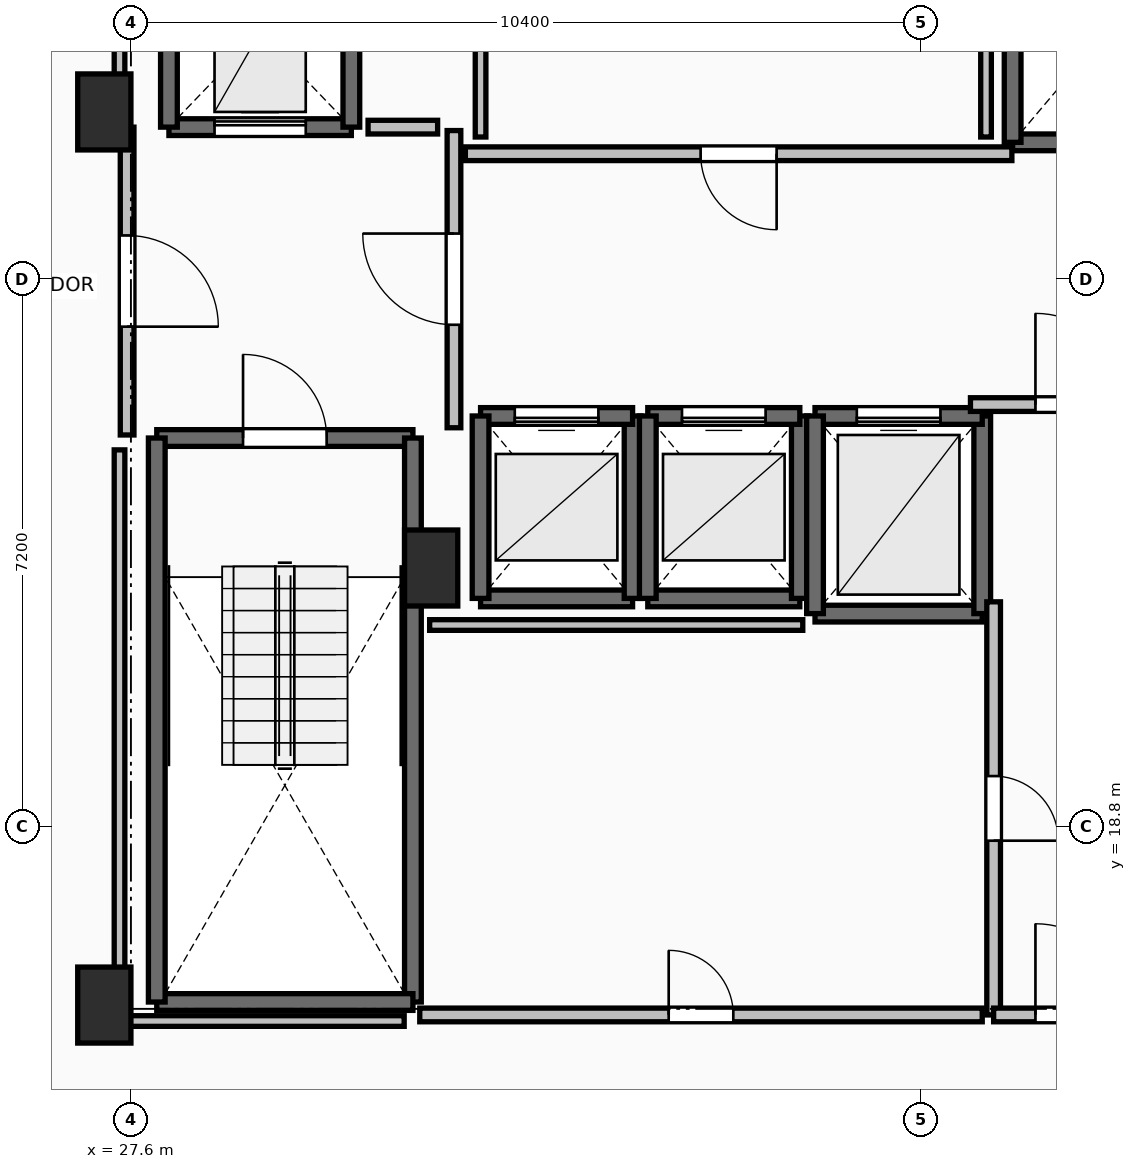
"""IFC4 building model, lengths in metres.
Left out: names, types, materials, properties, quantities, classifications, styles, units other than length and angle.
Written with IfcOpenShell. Run it as: python <this file> out.ifc"""

import sys

from ifc_helpers import new_model, si_unit, direction, frame, frame_2d, origin, origin_2d, place, context, subcontext, project, spatial, rectangle, extrude, element, fill, save


model = new_model("IFC4")
c1 = context("Model", 3, precision=1e-05, world=origin(), true_north=direction((0.0, 1.0)))
c2 = subcontext(c1, "Body", "Model", "MODEL_VIEW")
j1 = project(units=[si_unit("LENGTHUNIT", "METRE"), si_unit("PLANEANGLEUNIT", "RADIAN")], contexts=[c1])
p1 = place(None, origin())
s1 = spatial("IfcSite", under=j1, at=p1, CompositionType="ELEMENT")
p2 = place(p1, origin())
s2 = spatial("IfcBuilding", under=s1, at=p2, CompositionType="ELEMENT")
p3 = place(p2, frame((0.0, 0.0, 182.6)))
s3 = spatial("IfcBuildingStorey", under=s2, at=p3, CompositionType="ELEMENT", Elevation=182.6)
for number, where, z_axis, x_axis in (
    (1, (27.25, 16.45, 0.0), (0.0, 0.0, 1.0), (1.0, 0.0, 0.0)),
    (2, (27.25, 28.2, 0.0), (0.0, 0.0, 1.0), (1.0, 0.0, 0.0)),
    (3, (31.55, 22.2, 0.0), (0.0, 0.0, 1.0), (1.0, 0.0, 0.0)),
):
    element("IfcColumn", number, at=place(p3, frame(where, z_axis=z_axis, x_axis=x_axis)), inside=s3, PredefinedType="PILASTER", context=c2, shape_type="SweptSolid", body=[
        extrude(rectangle(XDim=0.7, YDim=1.0, at=origin_2d()), origin(), (0.0, 0.0, 1.0), 3.5),
    ])
p4 = place(p3, frame((27.94, 23.91, 0.0), z_axis=(0.0, 0.0, 1.0), x_axis=(1.0, 0.0, 0.0)))
e4 = element("IfcWall", 4, at=p4, inside=s3, PredefinedType="SOLIDWALL", context=c2, shape_type="SweptSolid", body=[
    extrude(rectangle(XDim=3.37, YDim=0.22, at=frame_2d((1.685, 0.0))), origin(), (0.0, 0.0, 1.0), 3.24),
])
p5 = place(p4, frame((1.135, 0.0, 0.0)))
e5 = element("IfcOpeningElement", 5, at=p5, cuts=e4, PredefinedType="OPENING", context=c2, shape_type="SweptSolid", body=[
    extrude(rectangle(XDim=1.1, YDim=2.15, at=frame_2d((0.55, 1.075))), frame((0.0, 0.125, 0.0), z_axis=(0.0, -1.0, 0.0), x_axis=(1.0, 0.0, 0.0)), (0.0, 0.0, 1.0), 0.25),
])
p6 = place(p3, frame((31.31, 23.91, 0.0), z_axis=(0.0, 0.0, 1.0), x_axis=(0.0, -1.0, 0.0)))
e6 = element("IfcWall", 6, at=p6, inside=s3, PredefinedType="SOLIDWALL", context=c2, shape_type="SweptSolid", body=[
    extrude(rectangle(XDim=7.42, YDim=0.22, at=frame_2d((3.71, 0.0))), origin(), (0.0, 0.0, 1.0), 3.24),
])
p7 = place(p3, frame((31.31, 16.49, 0.0), z_axis=(0.0, 0.0, 1.0), x_axis=(-1.0, 0.0, 0.0)))
e7 = element("IfcWall", 7, at=p7, inside=s3, PredefinedType="SOLIDWALL", context=c2, shape_type="SweptSolid", body=[
    extrude(rectangle(XDim=3.37, YDim=0.22, at=frame_2d((1.685, 0.0))), origin(), (0.0, 0.0, 1.0), 3.24),
])
p8 = place(p3, frame((27.94, 16.49, 0.0), z_axis=(0.0, 0.0, 1.0), x_axis=(0.0, 1.0, 0.0)))
e8 = element("IfcWall", 8, at=p8, inside=s3, PredefinedType="SOLIDWALL", context=c2, shape_type="SweptSolid", body=[
    extrude(rectangle(XDim=7.42, YDim=0.22, at=frame_2d((3.71, 0.0))), origin(), (0.0, 0.0, 1.0), 3.24),
])
p9 = place(p3, frame((32.2, 21.8, 0.0), z_axis=(0.0, 0.0, 1.0), x_axis=(1.0, 0.0, 0.0)))
e9 = element("IfcWall", 9, at=p9, inside=s3, PredefinedType="SOLIDWALL", context=c2, shape_type="SweptSolid", body=[
    extrude(rectangle(XDim=2.0, YDim=0.22, at=frame_2d((1.0, 0.0))), origin(), (0.0, 0.0, 1.0), 3.24),
])
p10 = place(p3, frame((34.2, 21.8, 0.0), z_axis=(0.0, 0.0, 1.0), x_axis=(0.0, 1.0, 0.0)))
e10 = element("IfcWall", 10, at=p10, inside=s3, PredefinedType="SOLIDWALL", context=c2, shape_type="SweptSolid", body=[
    extrude(rectangle(XDim=2.4, YDim=0.22, at=frame_2d((1.2, 0.0))), origin(), (0.0, 0.0, 1.0), 3.24),
])
p11 = place(p3, frame((34.2, 24.2, 0.0), z_axis=(0.0, 0.0, 1.0), x_axis=(-1.0, 0.0, 0.0)))
e11 = element("IfcWall", 11, at=p11, inside=s3, PredefinedType="SOLIDWALL", context=c2, shape_type="SweptSolid", body=[
    extrude(rectangle(XDim=2.0, YDim=0.22, at=frame_2d((1.0, 0.0))), origin(), (0.0, 0.0, 1.0), 3.24),
])
p12 = place(p11, frame((0.45, 0.0, 0.0)))
e12 = element("IfcOpeningElement", 12, at=p12, cuts=e11, PredefinedType="OPENING", context=c2, shape_type="SweptSolid", body=[
    extrude(rectangle(XDim=1.1, YDim=2.2, at=frame_2d((0.55, 1.1))), frame((0.0, 0.125, 0.0), z_axis=(0.0, -1.0, 0.0), x_axis=(1.0, 0.0, 0.0)), (0.0, 0.0, 1.0), 0.25),
])
p13 = place(p3, frame((32.2, 24.2, 0.0), z_axis=(0.0, 0.0, 1.0), x_axis=(0.0, -1.0, 0.0)))
e13 = element("IfcWall", 13, at=p13, inside=s3, PredefinedType="SOLIDWALL", context=c2, shape_type="SweptSolid", body=[
    extrude(rectangle(XDim=2.4, YDim=0.22, at=frame_2d((1.2, 0.0))), origin(), (0.0, 0.0, 1.0), 3.24),
])
p14 = place(p3, frame((34.4, 21.8, 0.0), z_axis=(0.0, 0.0, 1.0), x_axis=(1.0, 0.0, 0.0)))
e14 = element("IfcWall", 14, at=p14, inside=s3, PredefinedType="SOLIDWALL", context=c2, shape_type="SweptSolid", body=[
    extrude(rectangle(XDim=2.0, YDim=0.22, at=frame_2d((1.0, 0.0))), origin(), (0.0, 0.0, 1.0), 3.24),
])
p15 = place(p3, frame((36.4, 21.8, 0.0), z_axis=(0.0, 0.0, 1.0), x_axis=(0.0, 1.0, 0.0)))
e15 = element("IfcWall", 15, at=p15, inside=s3, PredefinedType="SOLIDWALL", context=c2, shape_type="SweptSolid", body=[
    extrude(rectangle(XDim=2.4, YDim=0.22, at=frame_2d((1.2, 0.0))), origin(), (0.0, 0.0, 1.0), 3.24),
])
p16 = place(p3, frame((36.4, 24.2, 0.0), z_axis=(0.0, 0.0, 1.0), x_axis=(-1.0, 0.0, 0.0)))
e16 = element("IfcWall", 16, at=p16, inside=s3, PredefinedType="SOLIDWALL", context=c2, shape_type="SweptSolid", body=[
    extrude(rectangle(XDim=2.0, YDim=0.22, at=frame_2d((1.0, 0.0))), origin(), (0.0, 0.0, 1.0), 3.24),
])
p17 = place(p16, frame((0.45, 0.0, 0.0)))
e17 = element("IfcOpeningElement", 17, at=p17, cuts=e16, PredefinedType="OPENING", context=c2, shape_type="SweptSolid", body=[
    extrude(rectangle(XDim=1.1, YDim=2.2, at=frame_2d((0.55, 1.1))), frame((0.0, 0.125, 0.0), z_axis=(0.0, -1.0, 0.0), x_axis=(1.0, 0.0, 0.0)), (0.0, 0.0, 1.0), 0.25),
])
p18 = place(p3, frame((34.4, 24.2, 0.0), z_axis=(0.0, 0.0, 1.0), x_axis=(0.0, -1.0, 0.0)))
e18 = element("IfcWall", 18, at=p18, inside=s3, PredefinedType="SOLIDWALL", context=c2, shape_type="SweptSolid", body=[
    extrude(rectangle(XDim=2.4, YDim=0.22, at=frame_2d((1.2, 0.0))), origin(), (0.0, 0.0, 1.0), 3.24),
])
p19 = place(p3, frame((36.6, 21.6, 0.0), z_axis=(0.0, 0.0, 1.0), x_axis=(1.0, 0.0, 0.0)))
e19 = element("IfcWall", 19, at=p19, inside=s3, PredefinedType="SOLIDWALL", context=c2, shape_type="SweptSolid", body=[
    extrude(rectangle(XDim=2.2, YDim=0.22, at=frame_2d((1.1, 0.0))), origin(), (0.0, 0.0, 1.0), 3.24),
])
p20 = place(p3, frame((38.8, 21.6, 0.0), z_axis=(0.0, 0.0, 1.0), x_axis=(0.0, 1.0, 0.0)))
e20 = element("IfcWall", 20, at=p20, inside=s3, PredefinedType="SOLIDWALL", context=c2, shape_type="SweptSolid", body=[
    extrude(rectangle(XDim=2.6, YDim=0.22, at=frame_2d((1.3, 0.0))), origin(), (0.0, 0.0, 1.0), 3.24),
])
p21 = place(p3, frame((38.8, 24.2, 0.0), z_axis=(0.0, 0.0, 1.0), x_axis=(-1.0, 0.0, 0.0)))
e21 = element("IfcWall", 21, at=p21, inside=s3, PredefinedType="SOLIDWALL", context=c2, shape_type="SweptSolid", body=[
    extrude(rectangle(XDim=2.2, YDim=0.22, at=frame_2d((1.1, 0.0))), origin(), (0.0, 0.0, 1.0), 3.24),
])
p22 = place(p21, frame((0.55, 0.0, 0.0)))
e22 = element("IfcOpeningElement", 22, at=p22, cuts=e21, PredefinedType="OPENING", context=c2, shape_type="SweptSolid", body=[
    extrude(rectangle(XDim=1.1, YDim=2.2, at=frame_2d((0.55, 1.1))), frame((0.0, 0.125, 0.0), z_axis=(0.0, -1.0, 0.0), x_axis=(1.0, 0.0, 0.0)), (0.0, 0.0, 1.0), 0.25),
])
p23 = place(p3, frame((36.6, 24.2, 0.0), z_axis=(0.0, 0.0, 1.0), x_axis=(0.0, -1.0, 0.0)))
e23 = element("IfcWall", 23, at=p23, inside=s3, PredefinedType="SOLIDWALL", context=c2, shape_type="SweptSolid", body=[
    extrude(rectangle(XDim=2.6, YDim=0.22, at=frame_2d((1.3, 0.0))), origin(), (0.0, 0.0, 1.0), 3.24),
])
p24 = place(p3, frame((39.2, 27.8, 0.0), z_axis=(0.0, 0.0, 1.0), x_axis=(1.0, 0.0, 0.0)))
e24 = element("IfcWall", 24, at=p24, inside=s3, PredefinedType="SOLIDWALL", context=c2, shape_type="SweptSolid", body=[
    extrude(rectangle(XDim=2.2, YDim=0.22, at=frame_2d((1.1, 0.0))), origin(), (0.0, 0.0, 1.0), 3.24),
])
p25 = place(p3, frame((39.2, 30.4, 0.0), z_axis=(0.0, 0.0, 1.0), x_axis=(0.0, -1.0, 0.0)))
e25 = element("IfcWall", 25, at=p25, inside=s3, PredefinedType="SOLIDWALL", context=c2, shape_type="SweptSolid", body=[
    extrude(rectangle(XDim=2.6, YDim=0.22, at=frame_2d((1.3, 0.0))), origin(), (0.0, 0.0, 1.0), 3.24),
])
p26 = place(p3, frame((28.1, 28.0, 0.0), z_axis=(0.0, 0.0, 1.0), x_axis=(1.0, 0.0, 0.0)))
e26 = element("IfcWall", 26, at=p26, inside=s3, PredefinedType="SHEAR", context=c2, shape_type="SweptSolid", body=[
    extrude(rectangle(XDim=2.4, YDim=0.22, at=frame_2d((1.2, 0.0))), origin(), (0.0, 0.0, 1.0), 3.24),
])
p27 = place(p26, frame((0.6, 0.0, 0.0)))
e27 = element("IfcOpeningElement", 27, at=p27, cuts=e26, PredefinedType="OPENING", context=c2, shape_type="SweptSolid", body=[
    extrude(rectangle(XDim=1.2, YDim=2.2, at=frame_2d((0.6, 1.1))), frame((0.0, 0.125, 0.0), z_axis=(0.0, -1.0, 0.0), x_axis=(1.0, 0.0, 0.0)), (0.0, 0.0, 1.0), 0.25),
])
for number, where, z_axis, x_axis in (
    (28, (30.5, 28.0, 0.0), (0.0, 0.0, 1.0), (0.0, 1.0, 0.0)),
    (29, (28.1, 30.5, 0.0), (0.0, 0.0, 1.0), (0.0, -1.0, 0.0)),
):
    element("IfcWall", number, at=place(p3, frame(where, z_axis=z_axis, x_axis=x_axis)), inside=s3, PredefinedType="SHEAR", context=c2, shape_type="SweptSolid", body=[
        extrude(rectangle(XDim=2.5, YDim=0.22, at=frame_2d((1.25, 0.0))), origin(), (0.0, 0.0, 1.0), 3.24),
    ])
p28 = place(p3, frame((31.85, 24.045, 0.0), z_axis=(0.0, 0.0, 1.0), x_axis=(0.0, 1.0, 0.0)))
e30 = element("IfcWall", 30, at=p28, inside=s3, PredefinedType="PARTITIONING", context=c2, shape_type="SweptSolid", body=[
    extrude(rectangle(XDim=3.91, YDim=0.18, at=frame_2d((1.955, 0.0))), origin(), (0.0, 0.0, 1.0), 3.24),
])
p29 = place(p28, frame((1.355, 0.0, 0.0)))
e31 = element("IfcOpeningElement", 31, at=p29, cuts=e30, PredefinedType="OPENING", context=c2, shape_type="SweptSolid", body=[
    extrude(rectangle(XDim=1.2, YDim=2.15, at=frame_2d((0.6, 1.075))), frame((0.0, 0.105, 0.0), z_axis=(0.0, -1.0, 0.0), x_axis=(1.0, 0.0, 0.0)), (0.0, 0.0, 1.0), 0.21),
])
p30 = place(p3, frame((27.55, 28.0, 0.0), z_axis=(0.0, 0.0, 1.0), x_axis=(0.0, -1.0, 0.0)))
e32 = element("IfcWall", 32, at=p30, inside=s3, PredefinedType="PARTITIONING", context=c2, shape_type="SweptSolid", body=[
    extrude(rectangle(XDim=4.05, YDim=0.18, at=frame_2d((2.025, 0.0))), origin(), (0.0, 0.0, 1.0), 3.24),
])
p31 = place(p30, frame((1.425, 0.0, 0.0)))
e33 = element("IfcOpeningElement", 33, at=p31, cuts=e32, PredefinedType="OPENING", context=c2, shape_type="SweptSolid", body=[
    extrude(rectangle(XDim=1.2, YDim=2.15, at=frame_2d((0.6, 1.075))), frame((0.0, 0.105, 0.0), z_axis=(0.0, -1.0, 0.0), x_axis=(1.0, 0.0, 0.0)), (0.0, 0.0, 1.0), 0.21),
])
p32 = place(p3, frame((38.645, 24.35, 0.0), z_axis=(0.0, 0.0, 1.0), x_axis=(1.0, 0.0, 0.0)))
e34 = element("IfcWall", 34, at=p32, inside=s3, PredefinedType="PARTITIONING", context=c2, shape_type="SweptSolid", body=[
    extrude(rectangle(XDim=2.91, YDim=0.18, at=frame_2d((1.455, 0.0))), origin(), (0.0, 0.0, 1.0), 3.24),
])
p33 = place(p32, frame((0.855, 0.0, 0.0)))
e35 = element("IfcOpeningElement", 35, at=p33, cuts=e34, PredefinedType="OPENING", context=c2, shape_type="SweptSolid", body=[
    extrude(rectangle(XDim=1.2, YDim=2.15, at=frame_2d((0.6, 1.075))), frame((0.0, 0.105, 0.0), z_axis=(0.0, -1.0, 0.0), x_axis=(1.0, 0.0, 0.0)), (0.0, 0.0, 1.0), 0.21),
])
p34 = place(p3, frame((39.19, 27.65, 0.0), z_axis=(0.0, 0.0, 1.0), x_axis=(-1.0, 0.0, 0.0)))
e36 = element("IfcWall", 36, at=p34, inside=s3, PredefinedType="PARTITIONING", context=c2, shape_type="SweptSolid", body=[
    extrude(rectangle(XDim=7.19, YDim=0.18, at=frame_2d((3.595, 0.0))), origin(), (0.0, 0.0, 1.0), 3.24),
])
p35 = place(p34, frame((3.095, 0.0, 0.0)))
e37 = element("IfcOpeningElement", 37, at=p35, cuts=e36, PredefinedType="OPENING", context=c2, shape_type="SweptSolid", body=[
    extrude(rectangle(XDim=1.0, YDim=2.15, at=frame_2d((0.5, 1.075))), frame((0.0, 0.105, 0.0), z_axis=(0.0, -1.0, 0.0), x_axis=(1.0, 0.0, 0.0)), (0.0, 0.0, 1.0), 0.21),
])
p36 = place(p3, frame((38.95, 21.755, 0.0), z_axis=(0.0, 0.0, 1.0), x_axis=(0.0, -1.0, 0.0)))
e38 = element("IfcWall", 38, at=p36, inside=s3, PredefinedType="PARTITIONING", context=c2, shape_type="SweptSolid", body=[
    extrude(rectangle(XDim=5.435, YDim=0.18, at=frame_2d((2.717, 0.0))), origin(), (0.0, 0.0, 1.0), 3.24),
])
p37 = place(p36, frame((2.292, 0.0, 0.0)))
e39 = element("IfcOpeningElement", 39, at=p37, cuts=e38, PredefinedType="OPENING", context=c2, shape_type="SweptSolid", body=[
    extrude(rectangle(XDim=0.85, YDim=2.1, at=frame_2d((0.425, 1.05))), frame((0.0, 0.105, 0.0), z_axis=(0.0, -1.0, 0.0), x_axis=(1.0, 0.0, 0.0)), (0.0, 0.0, 1.0), 0.21),
])
p38 = place(p3, frame((38.95, 16.32, 0.0), z_axis=(0.0, 0.0, 1.0), x_axis=(1.0, 0.0, 0.0)))
e40 = element("IfcWall", 40, at=p38, inside=s3, PredefinedType="PARTITIONING", context=c2, shape_type="SweptSolid", body=[
    extrude(rectangle(XDim=2.3, YDim=0.18, at=frame_2d((1.15, 0.0))), origin(), (0.0, 0.0, 1.0), 3.24),
])
p39 = place(p38, frame((0.55, 0.0, 0.0)))
e41 = element("IfcOpeningElement", 41, at=p39, cuts=e40, PredefinedType="OPENING", context=c2, shape_type="SweptSolid", body=[
    extrude(rectangle(XDim=1.2, YDim=2.15, at=frame_2d((0.6, 1.075))), frame((0.0, 0.105, 0.0), z_axis=(0.0, -1.0, 0.0), x_axis=(1.0, 0.0, 0.0)), (0.0, 0.0, 1.0), 0.21),
])
p40 = place(p3, frame((31.4, 16.32, 0.0), z_axis=(0.0, 0.0, 1.0), x_axis=(1.0, 0.0, 0.0)))
e42 = element("IfcWall", 42, at=p40, inside=s3, PredefinedType="PARTITIONING", context=c2, shape_type="SweptSolid", body=[
    extrude(rectangle(XDim=7.4, YDim=0.18, at=frame_2d((3.7, 0.0))), origin(), (0.0, 0.0, 1.0), 3.24),
])
p41 = place(p40, frame((3.275, 0.0, 0.0)))
e43 = element("IfcOpeningElement", 43, at=p41, cuts=e42, PredefinedType="OPENING", context=c2, shape_type="SweptSolid", body=[
    extrude(rectangle(XDim=0.85, YDim=2.1, at=frame_2d((0.425, 1.05))), frame((0.0, 0.105, 0.0), z_axis=(0.0, -1.0, 0.0), x_axis=(1.0, 0.0, 0.0)), (0.0, 0.0, 1.0), 0.21),
])
p42 = place(p3, frame((31.635, 28.0, 0.0), z_axis=(0.0, 0.0, 1.0), x_axis=(-1.0, 0.0, 0.0)))
e44 = element("IfcWall", 44, at=p42, inside=s3, PredefinedType="PARTITIONING", context=c2, shape_type="SweptSolid", body=[
    extrude(rectangle(XDim=0.915, YDim=0.18, at=frame_2d((0.458, 0.0))), origin(), (0.0, 0.0, 1.0), 3.24),
])
p43 = place(p3, frame((36.439, 21.45, 0.0), z_axis=(0.0, 0.0, 1.0), x_axis=(-1.0, 0.0, 0.0)))
e45 = element("IfcWall", 45, at=p43, inside=s3, PredefinedType="PARTITIONING", context=c2, shape_type="SweptSolid", body=[
    extrude(rectangle(XDim=4.909, YDim=0.14, at=frame_2d((2.455, 0.0))), origin(), (0.0, 0.0, 1.0), 3.24),
])
for number, where, z_axis, x_axis in (
    (46, (32.2, 30.26, 0.0), (0.0, 0.0, 1.0), (0.0, -1.0, 0.0)),
    (47, (38.85, 27.87, 0.0), (0.0, 0.0, 1.0), (0.0, 1.0, 0.0)),
):
    element("IfcWall", number, at=place(p3, frame(where, z_axis=z_axis, x_axis=x_axis)), inside=s3, PredefinedType="PARTITIONING", context=c2, shape_type="SweptSolid", body=[
        extrude(rectangle(XDim=2.39, YDim=0.14, at=frame_2d((1.195, 0.0))), origin(), (0.0, 0.0, 1.0), 3.24),
    ])
p44 = place(p3, frame((27.45, 33.45, 0.0), z_axis=(0.0, 0.0, 1.0), x_axis=(0.0, -1.0, 0.0)))
e48 = element("IfcWall", 48, at=p44, inside=s3, PredefinedType="PARTITIONING", context=c2, shape_type="SweptSolid", body=[
    extrude(rectangle(XDim=5.254, YDim=0.14, at=frame_2d((2.627, 0.0))), origin(), (0.0, 0.0, 1.0), 2.432),
])
p45 = place(p3, frame((27.45, 23.754, 0.0), z_axis=(0.0, 0.0, 1.0), x_axis=(0.0, -1.0, 0.0)))
e49 = element("IfcWall", 49, at=p45, inside=s3, PredefinedType="PARTITIONING", context=c2, shape_type="SweptSolid", body=[
    extrude(rectangle(XDim=7.514, YDim=0.14, at=frame_2d((3.757, 0.0))), origin(), (0.0, 0.0, 1.0), 2.432),
])
p46 = place(p3, frame((27.45, 16.24, 0.0), z_axis=(0.0, 0.0, 1.0), x_axis=(1.0, 0.0, 0.0)))
e50 = element("IfcWall", 50, at=p46, inside=s3, PredefinedType="PARTITIONING", context=c2, shape_type="SweptSolid", body=[
    extrude(rectangle(XDim=3.745, YDim=0.14, at=frame_2d((1.873, 0.0))), origin(), (0.0, 0.0, 1.0), 2.432),
])
p47 = place(p5, origin())
e51 = element("IfcDoor", 51, at=p47, inside=s3, OperationType="SINGLE_SWING_LEFT", PredefinedType="DOOR", context=c2, shape_type="SweptSolid", body=[
    extrude(rectangle(XDim=1.1, YDim=2.15, at=frame_2d((0.55, 1.075))), frame((0.0, 0.025, 0.0), z_axis=(0.0, -1.0, 0.0), x_axis=(1.0, 0.0, 0.0)), (0.0, 0.0, 1.0), 0.05),
])
fill(e5, e51)
p48 = place(p12, origin())
e52 = element("IfcDoor", 52, at=p48, inside=s3, OperationType="SLIDING_TO_LEFT", PredefinedType="DOOR", context=c2, shape_type="SweptSolid", body=[
    extrude(rectangle(XDim=1.1, YDim=2.2, at=frame_2d((0.55, 1.1))), frame((0.0, 0.025, 0.0), z_axis=(0.0, -1.0, 0.0), x_axis=(1.0, 0.0, 0.0)), (0.0, 0.0, 1.0), 0.05),
])
fill(e12, e52)
p49 = place(p17, origin())
e53 = element("IfcDoor", 53, at=p49, inside=s3, OperationType="SLIDING_TO_LEFT", PredefinedType="DOOR", context=c2, shape_type="SweptSolid", body=[
    extrude(rectangle(XDim=1.1, YDim=2.2, at=frame_2d((0.55, 1.1))), frame((0.0, 0.025, 0.0), z_axis=(0.0, -1.0, 0.0), x_axis=(1.0, 0.0, 0.0)), (0.0, 0.0, 1.0), 0.05),
])
fill(e17, e53)
p50 = place(p22, origin())
e54 = element("IfcDoor", 54, at=p50, inside=s3, OperationType="SLIDING_TO_LEFT", PredefinedType="DOOR", context=c2, shape_type="SweptSolid", body=[
    extrude(rectangle(XDim=1.1, YDim=2.2, at=frame_2d((0.55, 1.1))), frame((0.0, 0.025, 0.0), z_axis=(0.0, -1.0, 0.0), x_axis=(1.0, 0.0, 0.0)), (0.0, 0.0, 1.0), 0.05),
])
fill(e22, e54)
p51 = place(p27, origin())
e55 = element("IfcDoor", 55, at=p51, inside=s3, OperationType="SLIDING_TO_LEFT", PredefinedType="DOOR", context=c2, shape_type="SweptSolid", body=[
    extrude(rectangle(XDim=1.2, YDim=2.2, at=frame_2d((0.6, 1.1))), frame((0.0, 0.025, 0.0), z_axis=(0.0, -1.0, 0.0), x_axis=(1.0, 0.0, 0.0)), (0.0, 0.0, 1.0), 0.05),
])
fill(e27, e55)
p52 = place(p29, origin())
e56 = element("IfcDoor", 56, at=p52, inside=s3, OperationType="SINGLE_SWING_RIGHT", PredefinedType="DOOR", context=c2, shape_type="SweptSolid", body=[
    extrude(rectangle(XDim=1.2, YDim=2.15, at=frame_2d((0.6, 1.075))), frame((0.0, 0.025, 0.0), z_axis=(0.0, -1.0, 0.0), x_axis=(1.0, 0.0, 0.0)), (0.0, 0.0, 1.0), 0.05),
])
fill(e31, e56)
p53 = place(p31, origin())
e57 = element("IfcDoor", 57, at=p53, inside=s3, OperationType="SINGLE_SWING_RIGHT", PredefinedType="DOOR", context=c2, shape_type="SweptSolid", body=[
    extrude(rectangle(XDim=1.2, YDim=2.15, at=frame_2d((0.6, 1.075))), frame((0.0, 0.025, 0.0), z_axis=(0.0, -1.0, 0.0), x_axis=(1.0, 0.0, 0.0)), (0.0, 0.0, 1.0), 0.05),
])
fill(e33, e57)
p54 = place(p33, origin())
e58 = element("IfcDoor", 58, at=p54, inside=s3, OperationType="SINGLE_SWING_LEFT", PredefinedType="DOOR", context=c2, shape_type="SweptSolid", body=[
    extrude(rectangle(XDim=1.2, YDim=2.15, at=frame_2d((0.6, 1.075))), frame((0.0, 0.025, 0.0), z_axis=(0.0, -1.0, 0.0), x_axis=(1.0, 0.0, 0.0)), (0.0, 0.0, 1.0), 0.05),
])
fill(e35, e58)
p55 = place(p35, origin())
e59 = element("IfcDoor", 59, at=p55, inside=s3, OperationType="SINGLE_SWING_LEFT", PredefinedType="DOOR", context=c2, shape_type="SweptSolid", body=[
    extrude(rectangle(XDim=1.0, YDim=2.15, at=frame_2d((0.5, 1.075))), frame((0.0, 0.025, 0.0), z_axis=(0.0, -1.0, 0.0), x_axis=(1.0, 0.0, 0.0)), (0.0, 0.0, 1.0), 0.05),
])
fill(e37, e59)
p56 = place(p37, origin())
e60 = element("IfcDoor", 60, at=p56, inside=s3, OperationType="SINGLE_SWING_RIGHT", PredefinedType="DOOR", context=c2, shape_type="SweptSolid", body=[
    extrude(rectangle(XDim=0.85, YDim=2.1, at=frame_2d((0.425, 1.05))), frame((0.0, 0.025, 0.0), z_axis=(0.0, -1.0, 0.0), x_axis=(1.0, 0.0, 0.0)), (0.0, 0.0, 1.0), 0.05),
])
fill(e39, e60)
p57 = place(p39, origin())
e61 = element("IfcDoor", 61, at=p57, inside=s3, OperationType="SINGLE_SWING_LEFT", PredefinedType="DOOR", context=c2, shape_type="SweptSolid", body=[
    extrude(rectangle(XDim=1.2, YDim=2.15, at=frame_2d((0.6, 1.075))), frame((0.0, 0.025, 0.0), z_axis=(0.0, -1.0, 0.0), x_axis=(1.0, 0.0, 0.0)), (0.0, 0.0, 1.0), 0.05),
])
fill(e41, e61)
p58 = place(p41, origin())
e62 = element("IfcDoor", 62, at=p58, inside=s3, OperationType="SINGLE_SWING_LEFT", PredefinedType="DOOR", context=c2, shape_type="SweptSolid", body=[
    extrude(rectangle(XDim=0.85, YDim=2.1, at=frame_2d((0.425, 1.05))), frame((0.0, 0.025, 0.0), z_axis=(0.0, -1.0, 0.0), x_axis=(1.0, 0.0, 0.0)), (0.0, 0.0, 1.0), 0.05),
])
fill(e43, e62)
save(model, sys.argv[1])
